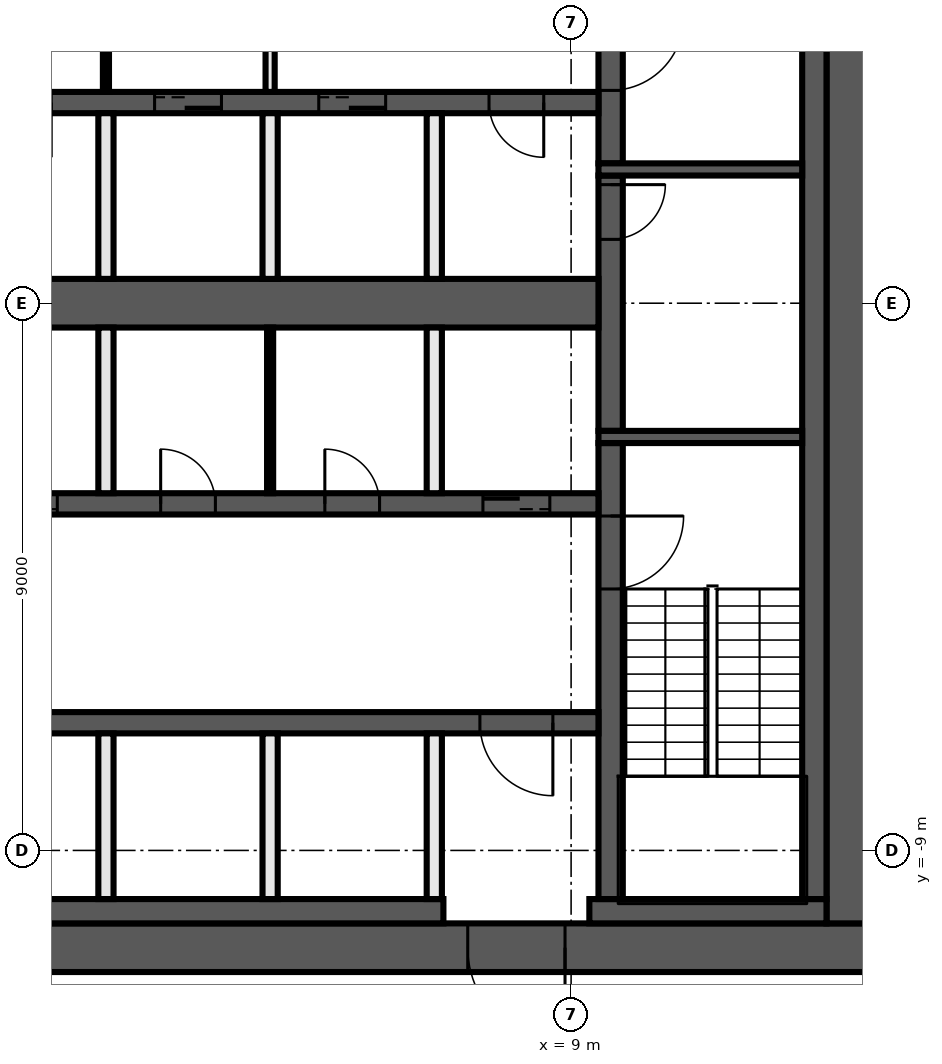
"""IFC4 building model, lengths in metres.
Left out: names, types, materials, properties, quantities, classifications, styles, units other than length and angle.
Written with IfcOpenShell. Run it as: python <this file> out.ifc"""

import sys

from ifc_helpers import new_model, si_unit, direction, frame, frame_2d, origin, place, context, subcontext, project, spatial, rectangle, extrude, element, fill, save


model = new_model("IFC4")
c1 = context("Model", 3, precision=1e-05, world=origin(), true_north=direction((0.0, 1.0)))
c2 = subcontext(c1, "Body", "Model", "MODEL_VIEW")
j1 = project(units=[si_unit("LENGTHUNIT", "METRE"), si_unit("PLANEANGLEUNIT", "RADIAN")], contexts=[c1])
p1 = place(None, origin())
s1 = spatial("IfcSite", under=j1, at=p1, CompositionType="ELEMENT")
p2 = place(p1, origin())
s2 = spatial("IfcBuilding", under=s1, at=p2, CompositionType="ELEMENT")
p3 = place(p2, frame((0.0, 0.0, 158.6)))
s3 = spatial("IfcBuildingStorey", under=s2, at=p3, CompositionType="ELEMENT", Elevation=158.6)
p4 = place(p3, frame((14.0, -10.6, 0.0), z_axis=(0.0, 0.0, 1.0), x_axis=(-1.0, 0.0, 0.0)))
e1 = element("IfcWall", 1, at=p4, inside=s3, PredefinedType="SHEAR", context=c2, shape_type="SweptSolid", body=[
    extrude(rectangle(XDim=28.0, YDim=0.8, at=frame_2d((14.0, 0.0))), origin(), (0.0, 0.0, 1.0), 3.82),
])
p5 = place(p4, frame((5.1, 0.0, 0.0)))
e2 = element("IfcOpeningElement", 2, at=p5, cuts=e1, PredefinedType="OPENING", context=c2, shape_type="SweptSolid", body=[
    extrude(rectangle(XDim=1.6, YDim=2.1, at=frame_2d((0.8, 1.05))), frame((0.0, 0.41, 0.0), z_axis=(0.0, -1.0, 0.0), x_axis=(1.0, 0.0, 0.0)), (0.0, 0.0, 1.0), 0.82),
])
p6 = place(p3, frame((13.6, 10.2, 0.0), z_axis=(0.0, 0.0, 1.0), x_axis=(0.0, -1.0, 0.0)))
e3 = element("IfcWall", 3, at=p6, inside=s3, PredefinedType="SHEAR", context=c2, shape_type="SweptSolid", body=[
    extrude(rectangle(XDim=20.4, YDim=0.8, at=frame_2d((10.2, 0.0))), origin(), (0.0, 0.0, 1.0), 3.82),
])
p7 = place(p3, frame((13.2, -10.0, 0.0), z_axis=(0.0, 0.0, 1.0), x_axis=(-1.0, 0.0, 0.0)))
e4 = element("IfcWall", 4, at=p7, inside=s3, PredefinedType="SHEAR", context=c2, shape_type="SweptSolid", body=[
    extrude(rectangle(XDim=3.9, YDim=0.4, at=frame_2d((1.95, 0.0))), origin(), (0.0, 0.0, 1.0), 3.82),
])
p8 = place(p3, frame((6.9, -10.0, 0.0), z_axis=(0.0, 0.0, 1.0), x_axis=(-1.0, 0.0, 0.0)))
e5 = element("IfcWall", 5, at=p8, inside=s3, PredefinedType="SHEAR", context=c2, shape_type="SweptSolid", body=[
    extrude(rectangle(XDim=20.1, YDim=0.4, at=frame_2d((10.05, 0.0))), origin(), (0.0, 0.0, 1.0), 3.82),
])
p9 = place(p3, frame((13.0, 9.8, 0.0), z_axis=(0.0, 0.0, 1.0), x_axis=(0.0, -1.0, 0.0)))
e6 = element("IfcWall", 6, at=p9, inside=s3, PredefinedType="SHEAR", context=c2, shape_type="SweptSolid", body=[
    extrude(rectangle(XDim=19.6, YDim=0.4, at=frame_2d((9.8, 0.0))), origin(), (0.0, 0.0, 1.0), 3.82),
])
p10 = place(p3, frame((9.65, -2.3, 0.0), z_axis=(0.0, 0.0, 1.0), x_axis=(0.0, -1.0, 0.0)))
e7 = element("IfcWall", 7, at=p10, inside=s3, PredefinedType="SHEAR", context=c2, shape_type="SweptSolid", body=[
    extrude(rectangle(XDim=7.5, YDim=0.4, at=frame_2d((3.75, 0.0))), origin(), (0.0, 0.0, 1.0), 3.82),
])
p11 = place(p10, frame((1.2, 0.0, 0.0)))
e8 = element("IfcOpeningElement", 8, at=p11, cuts=e7, PredefinedType="OPENING", context=c2, shape_type="SweptSolid", body=[
    extrude(rectangle(XDim=1.2, YDim=2.1, at=frame_2d((0.6, 1.05))), frame((0.0, 0.21, 0.0), z_axis=(0.0, -1.0, 0.0), x_axis=(1.0, 0.0, 0.0)), (0.0, 0.0, 1.0), 0.42),
])
p12 = place(p3, frame((9.65, 2.1, 0.0), z_axis=(0.0, 0.0, 1.0), x_axis=(0.0, -1.0, 0.0)))
e9 = element("IfcWall", 9, at=p12, inside=s3, PredefinedType="SHEAR", context=c2, shape_type="SweptSolid", body=[
    extrude(rectangle(XDim=4.2, YDim=0.4, at=frame_2d((2.1, 0.0))), origin(), (0.0, 0.0, 1.0), 3.82),
])
p13 = place(p12, frame((0.15, 0.0, 0.0)))
e10 = element("IfcOpeningElement", 10, at=p13, cuts=e9, PredefinedType="OPENING", context=c2, shape_type="SweptSolid", body=[
    extrude(rectangle(XDim=0.9, YDim=2.1, at=frame_2d((0.45, 1.05))), frame((0.0, 0.21, 0.0), z_axis=(0.0, -1.0, 0.0), x_axis=(1.0, 0.0, 0.0)), (0.0, 0.0, 1.0), 0.42),
])
p14 = place(p3, frame((9.65, 9.8, 0.0), z_axis=(0.0, 0.0, 1.0), x_axis=(0.0, -1.0, 0.0)))
e11 = element("IfcWall", 11, at=p14, inside=s3, PredefinedType="SHEAR", context=c2, shape_type="SweptSolid", body=[
    extrude(rectangle(XDim=7.5, YDim=0.4, at=frame_2d((3.75, 0.0))), origin(), (0.0, 0.0, 1.0), 3.82),
])
p15 = place(p14, frame((5.1, 0.0, 0.0)))
e12 = element("IfcOpeningElement", 12, at=p15, cuts=e11, PredefinedType="OPENING", context=c2, shape_type="SweptSolid", body=[
    extrude(rectangle(XDim=1.2, YDim=2.1, at=frame_2d((0.6, 1.05))), frame((0.0, 0.21, 0.0), z_axis=(0.0, -1.0, 0.0), x_axis=(1.0, 0.0, 0.0)), (0.0, 0.0, 1.0), 0.42),
])
for number, where, z_axis, x_axis in (
    (13, (9.45, 2.2, 0.0), (0.0, 0.0, 1.0), (1.0, 0.0, 0.0)),
    (14, (9.45, -2.2, 0.0), (0.0, 0.0, 1.0), (1.0, 0.0, 0.0)),
):
    element("IfcWall", number, at=place(p3, frame(where, z_axis=z_axis, x_axis=x_axis)), inside=s3, PredefinedType="SHEAR", context=c2, shape_type="SweptSolid", body=[
        extrude(rectangle(XDim=3.35, YDim=0.2, at=frame_2d((1.675, 0.0))), origin(), (0.0, 0.0, 1.0), 3.82),
    ])
p16 = place(p3, frame((9.45, 3.3, 0.0), z_axis=(0.0, 0.0, 1.0), x_axis=(-1.0, 0.0, 0.0)))
e15 = element("IfcWall", 15, at=p16, inside=s3, PredefinedType="SHEAR", context=c2, shape_type="SweptSolid", body=[
    extrude(rectangle(XDim=18.9, YDim=0.35, at=frame_2d((9.45, 0.0))), origin(), (0.0, 0.0, 1.0), 3.82),
])
p17 = place(p16, frame((6.2, 0.0, 0.0)))
e16 = element("IfcOpeningElement", 16, at=p17, cuts=e15, PredefinedType="OPENING", context=c2, shape_type="SweptSolid", body=[
    extrude(rectangle(XDim=1.1, YDim=2.1, at=frame_2d((0.55, 1.05))), frame((0.0, 0.185, 0.0), z_axis=(0.0, -1.0, 0.0), x_axis=(1.0, 0.0, 0.0)), (0.0, 0.0, 1.0), 0.37),
])
p18 = place(p16, frame((3.5, 0.0, 0.0)))
e17 = element("IfcOpeningElement", 17, at=p18, cuts=e15, PredefinedType="OPENING", context=c2, shape_type="SweptSolid", body=[
    extrude(rectangle(XDim=1.1, YDim=2.1, at=frame_2d((0.55, 1.05))), frame((0.0, 0.185, 0.0), z_axis=(0.0, -1.0, 0.0), x_axis=(1.0, 0.0, 0.0)), (0.0, 0.0, 1.0), 0.37),
])
p19 = place(p16, frame((0.9, 0.0, 0.0)))
e18 = element("IfcOpeningElement", 18, at=p19, cuts=e15, PredefinedType="OPENING", context=c2, shape_type="SweptSolid", body=[
    extrude(rectangle(XDim=0.9, YDim=2.1, at=frame_2d((0.45, 1.05))), frame((0.0, 0.185, 0.0), z_axis=(0.0, -1.0, 0.0), x_axis=(1.0, 0.0, 0.0)), (0.0, 0.0, 1.0), 0.37),
])
p20 = place(p16, frame((15.75, 0.0, 0.0)))
e19 = element("IfcOpeningElement", 19, at=p20, cuts=e15, PredefinedType="OPENING", context=c2, shape_type="SweptSolid", body=[
    extrude(rectangle(XDim=0.9, YDim=2.1, at=frame_2d((0.45, 1.05))), frame((0.0, 0.185, 0.0), z_axis=(0.0, -1.0, 0.0), x_axis=(1.0, 0.0, 0.0)), (0.0, 0.0, 1.0), 0.37),
])
p21 = place(p16, frame((11.7, 0.0, 0.0)))
e20 = element("IfcOpeningElement", 20, at=p21, cuts=e15, PredefinedType="OPENING", context=c2, shape_type="SweptSolid", body=[
    extrude(rectangle(XDim=0.9, YDim=2.1, at=frame_2d((0.45, 1.05))), frame((0.0, 0.185, 0.0), z_axis=(0.0, -1.0, 0.0), x_axis=(1.0, 0.0, 0.0)), (0.0, 0.0, 1.0), 0.37),
])
p22 = place(p16, frame((9.0, 0.0, 0.0)))
e21 = element("IfcOpeningElement", 21, at=p22, cuts=e15, PredefinedType="OPENING", context=c2, shape_type="SweptSolid", body=[
    extrude(rectangle(XDim=0.9, YDim=2.1, at=frame_2d((0.45, 1.05))), frame((0.0, 0.185, 0.0), z_axis=(0.0, -1.0, 0.0), x_axis=(1.0, 0.0, 0.0)), (0.0, 0.0, 1.0), 0.37),
])
p23 = place(p3, frame((-9.45, -3.3, 0.0), z_axis=(0.0, 0.0, 1.0), x_axis=(1.0, 0.0, 0.0)))
e22 = element("IfcWall", 22, at=p23, inside=s3, PredefinedType="SHEAR", context=c2, shape_type="SweptSolid", body=[
    extrude(rectangle(XDim=18.9, YDim=0.35, at=frame_2d((9.45, 0.0))), origin(), (0.0, 0.0, 1.0), 3.82),
])
p24 = place(p23, frame((0.8, 0.0, 0.0)))
e23 = element("IfcOpeningElement", 23, at=p24, cuts=e22, PredefinedType="OPENING", context=c2, shape_type="SweptSolid", body=[
    extrude(rectangle(XDim=1.1, YDim=2.1, at=frame_2d((0.55, 1.05))), frame((0.0, 0.185, 0.0), z_axis=(0.0, -1.0, 0.0), x_axis=(1.0, 0.0, 0.0)), (0.0, 0.0, 1.0), 0.37),
])
p25 = place(p23, frame((3.5, 0.0, 0.0)))
e24 = element("IfcOpeningElement", 24, at=p25, cuts=e22, PredefinedType="OPENING", context=c2, shape_type="SweptSolid", body=[
    extrude(rectangle(XDim=1.1, YDim=2.1, at=frame_2d((0.55, 1.05))), frame((0.0, 0.185, 0.0), z_axis=(0.0, -1.0, 0.0), x_axis=(1.0, 0.0, 0.0)), (0.0, 0.0, 1.0), 0.37),
])
p26 = place(p23, frame((6.2, 0.0, 0.0)))
e25 = element("IfcOpeningElement", 25, at=p26, cuts=e22, PredefinedType="OPENING", context=c2, shape_type="SweptSolid", body=[
    extrude(rectangle(XDim=1.1, YDim=2.1, at=frame_2d((0.55, 1.05))), frame((0.0, 0.185, 0.0), z_axis=(0.0, -1.0, 0.0), x_axis=(1.0, 0.0, 0.0)), (0.0, 0.0, 1.0), 0.37),
])
p27 = place(p23, frame((8.9, 0.0, 0.0)))
e26 = element("IfcOpeningElement", 26, at=p27, cuts=e22, PredefinedType="OPENING", context=c2, shape_type="SweptSolid", body=[
    extrude(rectangle(XDim=1.1, YDim=2.1, at=frame_2d((0.55, 1.05))), frame((0.0, 0.185, 0.0), z_axis=(0.0, -1.0, 0.0), x_axis=(1.0, 0.0, 0.0)), (0.0, 0.0, 1.0), 0.37),
])
p28 = place(p23, frame((17.0, 0.0, 0.0)))
e27 = element("IfcOpeningElement", 27, at=p28, cuts=e22, PredefinedType="OPENING", context=c2, shape_type="SweptSolid", body=[
    extrude(rectangle(XDim=1.1, YDim=2.1, at=frame_2d((0.55, 1.05))), frame((0.0, 0.185, 0.0), z_axis=(0.0, -1.0, 0.0), x_axis=(1.0, 0.0, 0.0)), (0.0, 0.0, 1.0), 0.37),
])
p29 = place(p23, frame((11.7, 0.0, 0.0)))
e28 = element("IfcOpeningElement", 28, at=p29, cuts=e22, PredefinedType="OPENING", context=c2, shape_type="SweptSolid", body=[
    extrude(rectangle(XDim=0.9, YDim=2.1, at=frame_2d((0.45, 1.05))), frame((0.0, 0.185, 0.0), z_axis=(0.0, -1.0, 0.0), x_axis=(1.0, 0.0, 0.0)), (0.0, 0.0, 1.0), 0.37),
])
p30 = place(p23, frame((14.4, 0.0, 0.0)))
e29 = element("IfcOpeningElement", 29, at=p30, cuts=e22, PredefinedType="OPENING", context=c2, shape_type="SweptSolid", body=[
    extrude(rectangle(XDim=0.9, YDim=2.1, at=frame_2d((0.45, 1.05))), frame((0.0, 0.185, 0.0), z_axis=(0.0, -1.0, 0.0), x_axis=(1.0, 0.0, 0.0)), (0.0, 0.0, 1.0), 0.37),
])
p31 = place(p3, frame((9.45, -6.9, 0.0), z_axis=(0.0, 0.0, 1.0), x_axis=(-1.0, 0.0, 0.0)))
e30 = element("IfcWall", 30, at=p31, inside=s3, PredefinedType="SHEAR", context=c2, shape_type="SweptSolid", body=[
    extrude(rectangle(XDim=18.9, YDim=0.35, at=frame_2d((9.45, 0.0))), origin(), (0.0, 0.0, 1.0), 3.82),
])
p32 = place(p31, frame((0.75, 0.0, 0.0)))
e31 = element("IfcOpeningElement", 31, at=p32, cuts=e30, PredefinedType="OPENING", context=c2, shape_type="SweptSolid", body=[
    extrude(rectangle(XDim=1.2, YDim=2.1, at=frame_2d((0.6, 1.05))), frame((0.0, 0.185, 0.0), z_axis=(0.0, -1.0, 0.0), x_axis=(1.0, 0.0, 0.0)), (0.0, 0.0, 1.0), 0.37),
])
p33 = place(p31, frame((15.75, 0.0, 0.0)))
e32 = element("IfcOpeningElement", 32, at=p33, cuts=e30, PredefinedType="OPENING", context=c2, shape_type="SweptSolid", body=[
    extrude(rectangle(XDim=0.9, YDim=2.1, at=frame_2d((0.45, 1.05))), frame((0.0, 0.185, 0.0), z_axis=(0.0, -1.0, 0.0), x_axis=(1.0, 0.0, 0.0)), (0.0, 0.0, 1.0), 0.37),
])
p34 = place(p31, frame((10.35, 0.0, 0.0)))
e33 = element("IfcOpeningElement", 33, at=p34, cuts=e30, PredefinedType="OPENING", context=c2, shape_type="SweptSolid", body=[
    extrude(rectangle(XDim=0.9, YDim=2.1, at=frame_2d((0.45, 1.05))), frame((0.0, 0.185, 0.0), z_axis=(0.0, -1.0, 0.0), x_axis=(1.0, 0.0, 0.0)), (0.0, 0.0, 1.0), 0.37),
])
p35 = place(p3, frame((-9.45, 0.0, 0.0), z_axis=(0.0, 0.0, 1.0), x_axis=(1.0, 0.0, 0.0)))
e34 = element("IfcWall", 34, at=p35, inside=s3, PredefinedType="SHEAR", context=c2, shape_type="SweptSolid", body=[
    extrude(rectangle(XDim=18.9, YDim=0.8, at=frame_2d((9.45, 0.0))), origin(), (0.0, 0.0, 1.0), 3.82),
])
for number, where, z_axis, x_axis in (
    (35, (6.75, -9.8, 0.0), (0.0, 0.0, 1.0), (0.0, 1.0, 0.0)),
    (36, (6.75, -3.125, 0.0), (0.0, 0.0, 1.0), (0.0, 1.0, 0.0)),
    (37, (6.75, 0.4, 0.0), (0.0, 0.0, 1.0), (0.0, 1.0, 0.0)),
):
    element("IfcWall", number, at=place(p3, frame(where, z_axis=z_axis, x_axis=x_axis)), inside=s3, PredefinedType="SOLIDWALL", context=c2, shape_type="SweptSolid", body=[
        extrude(rectangle(XDim=2.725, YDim=0.25, at=frame_2d((1.363, 0.0))), origin(), (0.0, 0.0, 1.0), 3.82),
    ])
p36 = place(p3, frame((4.05, 6.725, 0.0), z_axis=(0.0, 0.0, 1.0), x_axis=(0.0, -1.0, 0.0)))
e38 = element("IfcWall", 38, at=p36, inside=s3, PredefinedType="PARTITIONING", context=c2, shape_type="SweptSolid", body=[
    extrude(rectangle(XDim=3.25, YDim=0.15, at=frame_2d((1.625, 0.0))), origin(), (0.0, 0.0, 1.0), 3.82),
])
p37 = place(p36, frame((1.025, 0.0, 0.0)))
e39 = element("IfcOpeningElement", 39, at=p37, cuts=e38, PredefinedType="OPENING", context=c2, shape_type="SweptSolid", body=[
    extrude(rectangle(XDim=1.2, YDim=2.1, at=frame_2d((0.6, 1.05))), frame((0.0, 0.085, 0.0), z_axis=(0.0, -1.0, 0.0), x_axis=(1.0, 0.0, 0.0)), (0.0, 0.0, 1.0), 0.17),
])
p38 = place(p3, frame((4.05, -3.125, 0.0), z_axis=(0.0, 0.0, 1.0), x_axis=(0.0, 1.0, 0.0)))
e40 = element("IfcWall", 40, at=p38, inside=s3, PredefinedType="PARTITIONING", context=c2, shape_type="SweptSolid", body=[
    extrude(rectangle(XDim=2.725, YDim=0.1, at=frame_2d((1.363, 0.0))), origin(), (0.0, 0.0, 1.0), 3.82),
])
for number, where, z_axis, x_axis in (
    (41, (4.05, -9.8, 0.0), (0.0, 0.0, 1.0), (0.0, 1.0, 0.0)),
    (42, (4.05, 0.4, 0.0), (0.0, 0.0, 1.0), (0.0, 1.0, 0.0)),
):
    element("IfcWall", number, at=place(p3, frame(where, z_axis=z_axis, x_axis=x_axis)), inside=s3, PredefinedType="SOLIDWALL", context=c2, shape_type="SweptSolid", body=[
        extrude(rectangle(XDim=2.725, YDim=0.25, at=frame_2d((1.363, 0.0))), origin(), (0.0, 0.0, 1.0), 3.82),
    ])
p39 = place(p3, frame((1.35, 6.725, 0.0), z_axis=(0.0, 0.0, 1.0), x_axis=(0.0, -1.0, 0.0)))
e43 = element("IfcWall", 43, at=p39, inside=s3, PredefinedType="PARTITIONING", context=c2, shape_type="SweptSolid", body=[
    extrude(rectangle(XDim=3.25, YDim=0.1, at=frame_2d((1.625, 0.0))), origin(), (0.0, 0.0, 1.0), 3.82),
])
p40 = place(p39, frame((1.025, 0.0, 0.0)))
e44 = element("IfcOpeningElement", 44, at=p40, cuts=e43, PredefinedType="OPENING", context=c2, shape_type="SweptSolid", body=[
    extrude(rectangle(XDim=1.2, YDim=2.1, at=frame_2d((0.6, 1.05))), frame((0.0, 0.06, 0.0), z_axis=(0.0, -1.0, 0.0), x_axis=(1.0, 0.0, 0.0)), (0.0, 0.0, 1.0), 0.12),
])
for number, where, z_axis, x_axis in (
    (45, (1.35, -9.8, 0.0), (0.0, 0.0, 1.0), (0.0, 1.0, 0.0)),
    (46, (1.35, -3.125, 0.0), (0.0, 0.0, 1.0), (0.0, 1.0, 0.0)),
    (47, (1.35, 0.4, 0.0), (0.0, 0.0, 1.0), (0.0, 1.0, 0.0)),
):
    element("IfcWall", number, at=place(p3, frame(where, z_axis=z_axis, x_axis=x_axis)), inside=s3, PredefinedType="SOLIDWALL", context=c2, shape_type="SweptSolid", body=[
        extrude(rectangle(XDim=2.725, YDim=0.25, at=frame_2d((1.363, 0.0))), origin(), (0.0, 0.0, 1.0), 3.82),
    ])
p41 = place(p13, origin())
e48 = element("IfcDoor", 48, at=p41, inside=s3, OperationType="SINGLE_SWING_RIGHT", PredefinedType="DOOR", context=c2, shape_type="SweptSolid", body=[
    extrude(rectangle(XDim=0.9, YDim=2.1, at=frame_2d((0.45, 1.05))), frame((0.0, 0.025, 0.0), z_axis=(0.0, -1.0, 0.0), x_axis=(1.0, 0.0, 0.0)), (0.0, 0.0, 1.0), 0.05),
])
fill(e10, e48)
p42 = place(p17, origin())
e49 = element("IfcDoor", 49, at=p42, inside=s3, OperationType="DOUBLE_DOOR_SLIDING", PredefinedType="DOOR", context=c2, shape_type="SweptSolid", body=[
    extrude(rectangle(XDim=1.1, YDim=2.1, at=frame_2d((0.55, 1.05))), frame((0.0, 0.025, 0.0), z_axis=(0.0, -1.0, 0.0), x_axis=(1.0, 0.0, 0.0)), (0.0, 0.0, 1.0), 0.05),
])
fill(e16, e49)
p43 = place(p18, origin())
e50 = element("IfcDoor", 50, at=p43, inside=s3, OperationType="DOUBLE_DOOR_SLIDING", PredefinedType="DOOR", context=c2, shape_type="SweptSolid", body=[
    extrude(rectangle(XDim=1.1, YDim=2.1, at=frame_2d((0.55, 1.05))), frame((0.0, 0.025, 0.0), z_axis=(0.0, -1.0, 0.0), x_axis=(1.0, 0.0, 0.0)), (0.0, 0.0, 1.0), 0.05),
])
fill(e17, e50)
p44 = place(p19, origin())
e51 = element("IfcDoor", 51, at=p44, inside=s3, OperationType="SINGLE_SWING_LEFT", PredefinedType="DOOR", context=c2, shape_type="SweptSolid", body=[
    extrude(rectangle(XDim=0.9, YDim=2.1, at=frame_2d((0.45, 1.05))), frame((0.0, 0.025, 0.0), z_axis=(0.0, -1.0, 0.0), x_axis=(1.0, 0.0, 0.0)), (0.0, 0.0, 1.0), 0.05),
])
fill(e18, e51)
p45 = place(p27, origin())
e52 = element("IfcDoor", 52, at=p45, inside=s3, OperationType="DOUBLE_DOOR_SLIDING", PredefinedType="DOOR", context=c2, shape_type="SweptSolid", body=[
    extrude(rectangle(XDim=1.1, YDim=2.1, at=frame_2d((0.55, 1.05))), frame((0.0, 0.025, 0.0), z_axis=(0.0, -1.0, 0.0), x_axis=(1.0, 0.0, 0.0)), (0.0, 0.0, 1.0), 0.05),
])
fill(e26, e52)
p46 = place(p28, origin())
e53 = element("IfcDoor", 53, at=p46, inside=s3, OperationType="DOUBLE_DOOR_SLIDING", PredefinedType="DOOR", context=c2, shape_type="SweptSolid", body=[
    extrude(rectangle(XDim=1.1, YDim=2.1, at=frame_2d((0.55, 1.05))), frame((0.0, 0.025, 0.0), z_axis=(0.0, -1.0, 0.0), x_axis=(1.0, 0.0, 0.0)), (0.0, 0.0, 1.0), 0.05),
])
fill(e27, e53)
p47 = place(p5, origin())
e54 = element("IfcDoor", 54, at=p47, inside=s3, OperationType="DOUBLE_DOOR_SINGLE_SWING", PredefinedType="DOOR", context=c2, shape_type="SweptSolid", body=[
    extrude(rectangle(XDim=1.6, YDim=2.1, at=frame_2d((0.8, 1.05))), frame((0.0, 0.025, 0.0), z_axis=(0.0, -1.0, 0.0), x_axis=(1.0, 0.0, 0.0)), (0.0, 0.0, 1.0), 0.05),
])
fill(e2, e54)
p48 = place(p32, origin())
e55 = element("IfcDoor", 55, at=p48, inside=s3, OperationType="SINGLE_SWING_LEFT", PredefinedType="DOOR", context=c2, shape_type="SweptSolid", body=[
    extrude(rectangle(XDim=1.2, YDim=2.1, at=frame_2d((0.6, 1.05))), frame((0.0, 0.025, 0.0), z_axis=(0.0, -1.0, 0.0), x_axis=(1.0, 0.0, 0.0)), (0.0, 0.0, 1.0), 0.05),
])
fill(e31, e55)
p49 = place(p29, origin())
e56 = element("IfcDoor", 56, at=p49, inside=s3, OperationType="SINGLE_SWING_RIGHT", PredefinedType="DOOR", context=c2, shape_type="SweptSolid", body=[
    extrude(rectangle(XDim=0.9, YDim=2.1, at=frame_2d((0.45, 1.05))), frame((0.0, 0.025, 0.0), z_axis=(0.0, -1.0, 0.0), x_axis=(1.0, 0.0, 0.0)), (0.0, 0.0, 1.0), 0.05),
])
fill(e28, e56)
p50 = place(p30, origin())
e57 = element("IfcDoor", 57, at=p50, inside=s3, OperationType="SINGLE_SWING_LEFT", PredefinedType="DOOR", context=c2, shape_type="SweptSolid", body=[
    extrude(rectangle(XDim=0.9, YDim=2.1, at=frame_2d((0.45, 1.05))), frame((0.0, 0.025, 0.0), z_axis=(0.0, -1.0, 0.0), x_axis=(1.0, 0.0, 0.0)), (0.0, 0.0, 1.0), 0.05),
])
fill(e29, e57)
p51 = place(p15, origin())
e58 = element("IfcDoor", 58, at=p51, inside=s3, OperationType="SINGLE_SWING_LEFT", PredefinedType="DOOR", context=c2, shape_type="SweptSolid", body=[
    extrude(rectangle(XDim=1.2, YDim=2.1, at=frame_2d((0.6, 1.05))), frame((0.0, 0.025, 0.0), z_axis=(0.0, -1.0, 0.0), x_axis=(1.0, 0.0, 0.0)), (0.0, 0.0, 1.0), 0.05),
])
fill(e12, e58)
p52 = place(p11, origin())
e59 = element("IfcDoor", 59, at=p52, inside=s3, OperationType="SINGLE_SWING_RIGHT", PredefinedType="DOOR", context=c2, shape_type="SweptSolid", body=[
    extrude(rectangle(XDim=1.2, YDim=2.1, at=frame_2d((0.6, 1.05))), frame((0.0, 0.025, 0.0), z_axis=(0.0, -1.0, 0.0), x_axis=(1.0, 0.0, 0.0)), (0.0, 0.0, 1.0), 0.05),
])
fill(e8, e59)
save(model, sys.argv[1])
